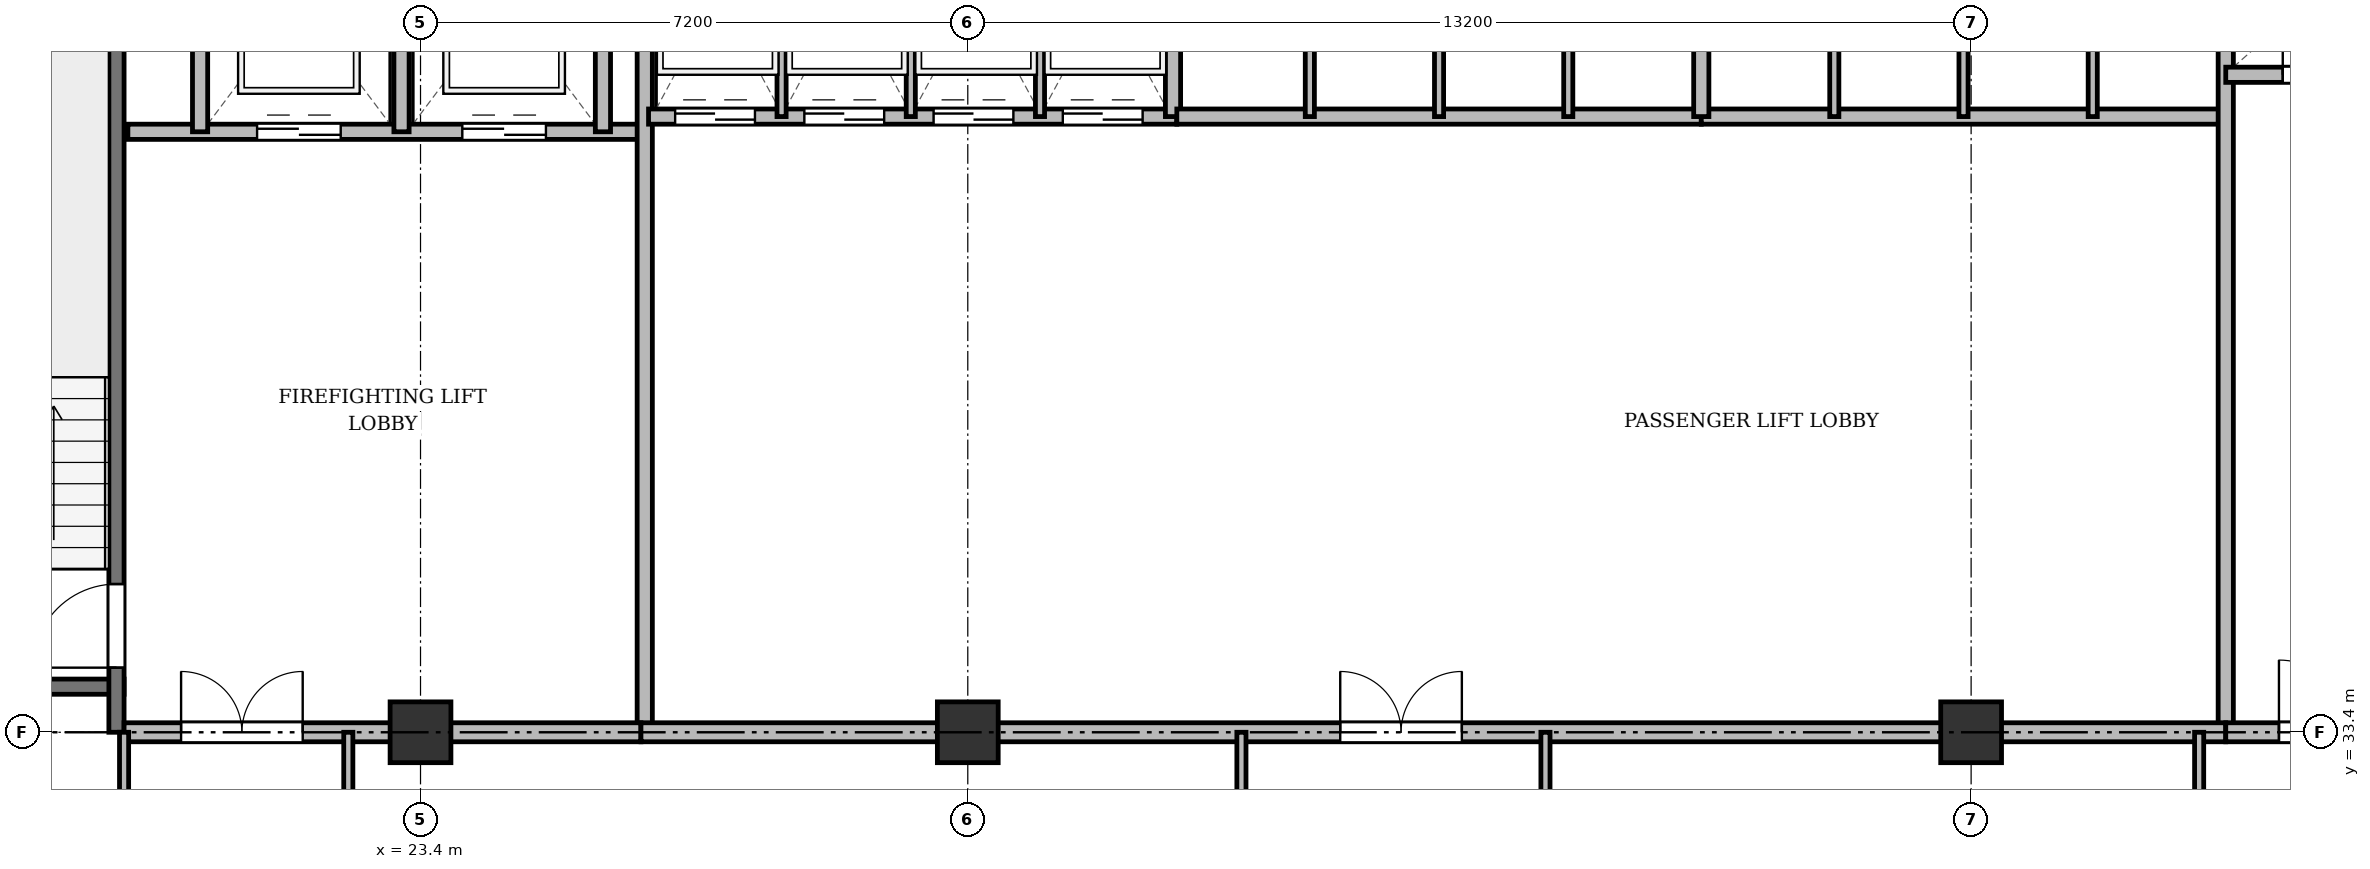
"""IFC4 building model, lengths in metres.
Left out: names, types, materials, properties, quantities, classifications, styles, units other than length and angle.
Written with IfcOpenShell. Run it as: python <this file> out.ifc"""

import sys

from ifc_helpers import new_model, si_unit, direction, frame, frame_2d, origin, origin_2d, place, context, subcontext, project, spatial, rectangle, extrude, source, transform, mapped, element, fill, save


model = new_model("IFC4")
c1 = context("Model", 3, precision=1e-05, world=origin(), true_north=direction((0.0, 1.0)))
c2 = subcontext(c1, "Body", "Model", "MODEL_VIEW")
j1 = project(units=[si_unit("LENGTHUNIT", "METRE"), si_unit("PLANEANGLEUNIT", "RADIAN")], contexts=[c1])
p1 = place(None, origin())
s1 = spatial("IfcSite", under=j1, at=p1, CompositionType="ELEMENT")
p2 = place(p1, origin())
s2 = spatial("IfcBuilding", under=s1, at=p2, CompositionType="ELEMENT")
p3 = place(p2, frame((0.0, 0.0, 88.9)))
s3 = spatial("IfcBuildingStorey", under=s2, at=p3, CompositionType="ELEMENT", Elevation=88.9)
m1 = source(origin(), c2, "Body", "SweptSolid", [
    extrude(rectangle(XDim=0.8, YDim=0.8, at=origin_2d()), origin(), (0.0, 0.0, 1.0), 3.6),
])
for number, where, z_axis, x_axis in (
    (1, (23.4, 33.4, 0.0), (0.0, 0.0, 1.0), (1.0, 0.0, 0.0)),
    (2, (30.6, 33.4, 0.0), (0.0, 0.0, 1.0), (1.0, 0.0, 0.0)),
    (3, (43.8, 33.4, 0.0), (0.0, 0.0, 1.0), (1.0, 0.0, 0.0)),
):
    element("IfcColumn", number, at=place(p3, frame(where, z_axis=z_axis, x_axis=x_axis)), inside=s3, PredefinedType="COLUMN", context=c2, shape_type="MappedRepresentation", body=[
        mapped(m1, transform((0.0, 0.0, 0.0), x_axis=(1.0, 0.0, 0.0), y_axis=(0.0, 1.0, 0.0), z_axis=(0.0, 0.0, 1.0), scale=1.0)),
    ])
p4 = place(p3, frame((16.1, 34.0, 0.0), z_axis=(0.0, 0.0, 1.0), x_axis=(1.0, 0.0, 0.0)))
e4 = element("IfcWall", 4, at=p4, inside=s3, PredefinedType="SHEAR", context=c2, shape_type="SweptSolid", body=[
    extrude(rectangle(XDim=3.4, YDim=0.2, at=frame_2d((1.7, 0.0))), origin(), (0.0, 0.0, 1.0), 3.34),
])
p5 = place(p3, frame((19.4, 33.4, 0.0), z_axis=(0.0, 0.0, 1.0), x_axis=(0.0, 1.0, 0.0)))
e5 = element("IfcWall", 5, at=p5, inside=s3, PredefinedType="SHEAR", context=c2, shape_type="SweptSolid", body=[
    extrude(rectangle(XDim=11.1, YDim=0.2, at=frame_2d((5.55, 0.0))), origin(), (0.0, 0.0, 1.0), 3.34),
])
p6 = place(p5, frame((0.85, 0.0, 0.0)))
e6 = element("IfcOpeningElement", 6, at=p6, cuts=e5, PredefinedType="OPENING", context=c2, shape_type="SweptSolid", body=[
    extrude(rectangle(XDim=1.1, YDim=2.15, at=frame_2d((0.55, 1.075))), frame((0.0, 0.11, 0.0), z_axis=(0.0, -1.0, 0.0), x_axis=(1.0, 0.0, 0.0)), (0.0, 0.0, 1.0), 0.22),
])
p7 = place(p3, frame((19.55, 41.3, 0.0), z_axis=(0.0, 0.0, 1.0), x_axis=(1.0, 0.0, 0.0)))
e7 = element("IfcWall", 7, at=p7, inside=s3, PredefinedType="SOLIDWALL", context=c2, shape_type="SweptSolid", body=[
    extrude(rectangle(XDim=6.75, YDim=0.2, at=frame_2d((3.375, 0.0))), origin(), (0.0, 0.0, 1.0), 3.34),
])
p8 = place(p7, frame((1.7, 0.0, 0.0)))
e8 = element("IfcOpeningElement", 8, at=p8, cuts=e7, PredefinedType="OPENING", context=c2, shape_type="SweptSolid", body=[
    extrude(rectangle(XDim=1.1, YDim=2.15, at=frame_2d((0.55, 1.075))), frame((0.0, 0.11, 0.0), z_axis=(0.0, -1.0, 0.0), x_axis=(1.0, 0.0, 0.0)), (0.0, 0.0, 1.0), 0.22),
])
p9 = place(p7, frame((4.4, 0.0, 0.0)))
e9 = element("IfcOpeningElement", 9, at=p9, cuts=e7, PredefinedType="OPENING", context=c2, shape_type="SweptSolid", body=[
    extrude(rectangle(XDim=1.1, YDim=2.15, at=frame_2d((0.55, 1.075))), frame((0.0, 0.11, 0.0), z_axis=(0.0, -1.0, 0.0), x_axis=(1.0, 0.0, 0.0)), (0.0, 0.0, 1.0), 0.22),
])
for number, where, z_axis, x_axis in (
    (10, (20.5, 41.3, 0.0), (0.0, 0.0, 1.0), (0.0, 1.0, 0.0)),
    (11, (23.15, 41.3, 0.0), (0.0, 0.0, 1.0), (0.0, 1.0, 0.0)),
    (12, (25.8, 41.3, 0.0), (0.0, 0.0, 1.0), (0.0, 1.0, 0.0)),
):
    element("IfcWall", number, at=place(p3, frame(where, z_axis=z_axis, x_axis=x_axis)), inside=s3, PredefinedType="SOLIDWALL", context=c2, shape_type="SweptSolid", body=[
        extrude(rectangle(XDim=3.4, YDim=0.2, at=frame_2d((1.7, 0.0))), origin(), (0.0, 0.0, 1.0), 3.34),
    ])
p10 = place(p3, frame((26.35, 33.4, 0.0), z_axis=(0.0, 0.0, 1.0), x_axis=(0.0, 1.0, 0.0)))
e13 = element("IfcWall", 13, at=p10, inside=s3, PredefinedType="SOLIDWALL", context=c2, shape_type="SweptSolid", body=[
    extrude(rectangle(XDim=11.3, YDim=0.2, at=frame_2d((5.65, 0.0))), origin(), (0.0, 0.0, 1.0), 2.752),
])
p11 = place(p3, frame((19.5, 33.4, 0.0), z_axis=(0.0, 0.0, 1.0), x_axis=(1.0, 0.0, 0.0)))
e14 = element("IfcWall", 14, at=p11, inside=s3, PredefinedType="PARTITIONING", context=c2, shape_type="SweptSolid", body=[
    extrude(rectangle(XDim=6.8, YDim=0.25, at=frame_2d((3.4, 0.0))), origin(), (0.0, 0.0, 1.0), 2.752),
])
p12 = place(p11, frame((0.75, 0.0, 0.0)))
e15 = element("IfcOpeningElement", 15, at=p12, cuts=e14, PredefinedType="OPENING", context=c2, shape_type="SweptSolid", body=[
    extrude(rectangle(XDim=1.6, YDim=2.2, at=frame_2d((0.8, 1.1))), frame((0.0, 0.135, 0.0), z_axis=(0.0, -1.0, 0.0), x_axis=(1.0, 0.0, 0.0)), (0.0, 0.0, 1.0), 0.27),
])
p13 = place(p3, frame((26.4, 41.5, 0.0), z_axis=(0.0, 0.0, 1.0), x_axis=(1.0, 0.0, 0.0)))
e16 = element("IfcWall", 16, at=p13, inside=s3, PredefinedType="SOLIDWALL", context=c2, shape_type="SweptSolid", body=[
    extrude(rectangle(XDim=6.95, YDim=0.2, at=frame_2d((3.475, 0.0))), origin(), (0.0, 0.0, 1.0), 3.34),
])
p14 = place(p13, frame((0.35, 0.0, 0.0)))
e17 = element("IfcOpeningElement", 17, at=p14, cuts=e16, PredefinedType="OPENING", context=c2, shape_type="SweptSolid", body=[
    extrude(rectangle(XDim=1.05, YDim=2.15, at=frame_2d((0.525, 1.075))), frame((0.0, 0.11, 0.0), z_axis=(0.0, -1.0, 0.0), x_axis=(1.0, 0.0, 0.0)), (0.0, 0.0, 1.0), 0.22),
])
p15 = place(p13, frame((2.05, 0.0, 0.0)))
e18 = element("IfcOpeningElement", 18, at=p15, cuts=e16, PredefinedType="OPENING", context=c2, shape_type="SweptSolid", body=[
    extrude(rectangle(XDim=1.05, YDim=2.15, at=frame_2d((0.525, 1.075))), frame((0.0, 0.11, 0.0), z_axis=(0.0, -1.0, 0.0), x_axis=(1.0, 0.0, 0.0)), (0.0, 0.0, 1.0), 0.22),
])
p16 = place(p13, frame((3.75, 0.0, 0.0)))
e19 = element("IfcOpeningElement", 19, at=p16, cuts=e16, PredefinedType="OPENING", context=c2, shape_type="SweptSolid", body=[
    extrude(rectangle(XDim=1.05, YDim=2.15, at=frame_2d((0.525, 1.075))), frame((0.0, 0.11, 0.0), z_axis=(0.0, -1.0, 0.0), x_axis=(1.0, 0.0, 0.0)), (0.0, 0.0, 1.0), 0.22),
])
p17 = place(p13, frame((5.45, 0.0, 0.0)))
e20 = element("IfcOpeningElement", 20, at=p17, cuts=e16, PredefinedType="OPENING", context=c2, shape_type="SweptSolid", body=[
    extrude(rectangle(XDim=1.05, YDim=2.15, at=frame_2d((0.525, 1.075))), frame((0.0, 0.11, 0.0), z_axis=(0.0, -1.0, 0.0), x_axis=(1.0, 0.0, 0.0)), (0.0, 0.0, 1.0), 0.22),
])
p18 = place(p3, frame((33.3, 41.5, 0.0), z_axis=(0.0, 0.0, 1.0), x_axis=(0.0, 1.0, 0.0)))
e21 = element("IfcWall", 21, at=p18, inside=s3, PredefinedType="SOLIDWALL", context=c2, shape_type="SweptSolid", body=[
    extrude(rectangle(XDim=3.2, YDim=0.2, at=frame_2d((1.6, 0.0))), origin(), (0.0, 0.0, 1.0), 3.34),
])
for number, where, z_axis, x_axis in (
    (22, (28.15, 41.5, 0.0), (0.0, 0.0, 1.0), (0.0, 1.0, 0.0)),
    (23, (29.85, 41.5, 0.0), (0.0, 0.0, 1.0), (0.0, 1.0, 0.0)),
    (24, (31.55, 41.5, 0.0), (0.0, 0.0, 1.0), (0.0, 1.0, 0.0)),
):
    element("IfcWall", number, at=place(p3, frame(where, z_axis=z_axis, x_axis=x_axis)), inside=s3, PredefinedType="PARTITIONING", context=c2, shape_type="SweptSolid", body=[
        extrude(rectangle(XDim=3.2, YDim=0.12, at=frame_2d((1.6, 0.0))), origin(), (0.0, 0.0, 1.0), 3.34),
    ])
p19 = place(p3, frame((33.35, 41.5, 0.0), z_axis=(0.0, 0.0, 1.0), x_axis=(1.0, 0.0, 0.0)))
e25 = element("IfcWall", 25, at=p19, inside=s3, PredefinedType="SOLIDWALL", context=c2, shape_type="SweptSolid", body=[
    extrude(rectangle(XDim=6.9, YDim=0.2, at=frame_2d((3.45, 0.0))), origin(), (0.0, 0.0, 1.0), 3.34),
])
for number, where, z_axis, x_axis in (
    (26, (35.1, 41.5, 0.0), (0.0, 0.0, 1.0), (0.0, 1.0, 0.0)),
    (27, (36.8, 41.5, 0.0), (0.0, 0.0, 1.0), (0.0, 1.0, 0.0)),
    (28, (38.5, 41.5, 0.0), (0.0, 0.0, 1.0), (0.0, 1.0, 0.0)),
):
    element("IfcWall", number, at=place(p3, frame(where, z_axis=z_axis, x_axis=x_axis)), inside=s3, PredefinedType="PARTITIONING", context=c2, shape_type="SweptSolid", body=[
        extrude(rectangle(XDim=3.2, YDim=0.12, at=frame_2d((1.6, 0.0))), origin(), (0.0, 0.0, 1.0), 3.34),
    ])
p20 = place(p3, frame((40.25, 41.5, 0.0), z_axis=(0.0, 0.0, 1.0), x_axis=(1.0, 0.0, 0.0)))
e29 = element("IfcWall", 29, at=p20, inside=s3, PredefinedType="SOLIDWALL", context=c2, shape_type="SweptSolid", body=[
    extrude(rectangle(XDim=6.9, YDim=0.2, at=frame_2d((3.45, 0.0))), origin(), (0.0, 0.0, 1.0), 2.84),
])
p21 = place(p3, frame((40.25, 41.5, 0.0), z_axis=(0.0, 0.0, 1.0), x_axis=(0.0, 1.0, 0.0)))
e30 = element("IfcWall", 30, at=p21, inside=s3, PredefinedType="SOLIDWALL", context=c2, shape_type="SweptSolid", body=[
    extrude(rectangle(XDim=3.2, YDim=0.2, at=frame_2d((1.6, 0.0))), origin(), (0.0, 0.0, 1.0), 3.34),
])
p22 = place(p3, frame((42.0, 41.5, 0.0), z_axis=(0.0, 0.0, 1.0), x_axis=(0.0, 1.0, 0.0)))
e31 = element("IfcWall", 31, at=p22, inside=s3, PredefinedType="PARTITIONING", context=c2, shape_type="SweptSolid", body=[
    extrude(rectangle(XDim=3.2, YDim=0.12, at=frame_2d((1.6, 0.0))), origin(), (0.0, 0.0, 1.0), 3.34),
])
p23 = place(p3, frame((43.7, 41.5, 0.0), z_axis=(0.0, 0.0, 1.0), x_axis=(0.0, 1.0, 0.0)))
e32 = element("IfcWall", 32, at=p23, inside=s3, PredefinedType="PARTITIONING", context=c2, shape_type="SweptSolid", body=[
    extrude(rectangle(XDim=3.2, YDim=0.12, at=frame_2d((1.6, 0.0))), origin(), (0.0, 0.0, 1.0), 2.84),
])
p24 = place(p3, frame((45.4, 41.5, 0.0), z_axis=(0.0, 0.0, 1.0), x_axis=(0.0, 1.0, 0.0)))
e33 = element("IfcWall", 33, at=p24, inside=s3, PredefinedType="PARTITIONING", context=c2, shape_type="SweptSolid", body=[
    extrude(rectangle(XDim=3.2, YDim=0.12, at=frame_2d((1.6, 0.0))), origin(), (0.0, 0.0, 1.0), 3.34),
])
p25 = place(p3, frame((47.15, 33.4, 0.0), z_axis=(0.0, 0.0, 1.0), x_axis=(0.0, 1.0, 0.0)))
e34 = element("IfcWall", 34, at=p25, inside=s3, PredefinedType="SOLIDWALL", context=c2, shape_type="SweptSolid", body=[
    extrude(rectangle(XDim=11.3, YDim=0.2, at=frame_2d((5.65, 0.0))), origin(), (0.0, 0.0, 1.0), 2.752),
])
p26 = place(p3, frame((26.3, 33.4, 0.0), z_axis=(0.0, 0.0, 1.0), x_axis=(1.0, 0.0, 0.0)))
e35 = element("IfcWall", 35, at=p26, inside=s3, PredefinedType="PARTITIONING", context=c2, shape_type="SweptSolid", body=[
    extrude(rectangle(XDim=20.85, YDim=0.25, at=frame_2d((10.425, 0.0))), origin(), (0.0, 0.0, 1.0), 2.752),
])
p27 = place(p26, frame((9.2, 0.0, 0.0)))
e36 = element("IfcOpeningElement", 36, at=p27, cuts=e35, PredefinedType="OPENING", context=c2, shape_type="SweptSolid", body=[
    extrude(rectangle(XDim=1.6, YDim=2.2, at=frame_2d((0.8, 1.1))), frame((0.0, 0.135, 0.0), z_axis=(0.0, -1.0, 0.0), x_axis=(1.0, 0.0, 0.0)), (0.0, 0.0, 1.0), 0.27),
])
p28 = place(p3, frame((47.15, 42.05, 0.0), z_axis=(0.0, 0.0, 1.0), x_axis=(1.0, 0.0, 0.0)))
e37 = element("IfcWall", 37, at=p28, inside=s3, PredefinedType="SOLIDWALL", context=c2, shape_type="SweptSolid", body=[
    extrude(rectangle(XDim=7.85, YDim=0.2, at=frame_2d((3.925, 0.0))), origin(), (0.0, 0.0, 1.0), 2.84),
])
p29 = place(p28, frame((0.75, 0.0, 0.0)))
e38 = element("IfcOpeningElement", 38, at=p29, cuts=e37, PredefinedType="OPENING", context=c2, shape_type="SweptSolid", body=[
    extrude(rectangle(XDim=0.9, YDim=2.1, at=frame_2d((0.45, 1.05))), frame((0.0, 0.11, 0.0), z_axis=(0.0, -1.0, 0.0), x_axis=(1.0, 0.0, 0.0)), (0.0, 0.0, 1.0), 0.22),
])
p30 = place(p28, frame((3.85, 0.0, 0.0)))
e39 = element("IfcOpeningElement", 39, at=p30, cuts=e37, PredefinedType="OPENING", context=c2, shape_type="SweptSolid", body=[
    extrude(rectangle(XDim=0.9, YDim=2.1, at=frame_2d((0.45, 1.05))), frame((0.0, 0.11, 0.0), z_axis=(0.0, -1.0, 0.0), x_axis=(1.0, 0.0, 0.0)), (0.0, 0.0, 1.0), 0.22),
])
p31 = place(p3, frame((47.15, 33.4, 0.0), z_axis=(0.0, 0.0, 1.0), x_axis=(1.0, 0.0, 0.0)))
e40 = element("IfcWall", 40, at=p31, inside=s3, PredefinedType="PARTITIONING", context=c2, shape_type="SweptSolid", body=[
    extrude(rectangle(XDim=11.15, YDim=0.25, at=frame_2d((5.575, 0.0))), origin(), (0.0, 0.0, 1.0), 2.752),
])
p32 = place(p31, frame((0.7, 0.0, 0.0)))
e41 = element("IfcOpeningElement", 41, at=p32, cuts=e40, PredefinedType="OPENING", context=c2, shape_type="SweptSolid", body=[
    extrude(rectangle(XDim=0.95, YDim=2.15, at=frame_2d((0.475, 1.075))), frame((0.0, 0.135, 0.0), z_axis=(0.0, -1.0, 0.0), x_axis=(1.0, 0.0, 0.0)), (0.0, 0.0, 1.0), 0.27),
])
p33 = place(p31, frame((6.0, 0.0, 0.0)))
e42 = element("IfcOpeningElement", 42, at=p33, cuts=e40, PredefinedType="OPENING", context=c2, shape_type="SweptSolid", body=[
    extrude(rectangle(XDim=1.2, YDim=2.15, at=frame_2d((0.6, 1.075))), frame((0.0, 0.135, 0.0), z_axis=(0.0, -1.0, 0.0), x_axis=(1.0, 0.0, 0.0)), (0.0, 0.0, 1.0), 0.27),
])
for number, where, z_axis, x_axis in (
    (43, (19.5, 29.8, 0.0), (0.0, 0.0, 1.0), (0.0, 1.0, 0.0)),
    (44, (22.45, 29.8, 0.0), (0.0, 0.0, 1.0), (0.0, 1.0, 0.0)),
    (45, (34.2, 29.8, 0.0), (0.0, 0.0, 1.0), (0.0, 1.0, 0.0)),
    (46, (38.2, 29.8, 0.0), (0.0, 0.0, 1.0), (0.0, 1.0, 0.0)),
    (47, (46.8, 29.8, 0.0), (0.0, 0.0, 1.0), (0.0, 1.0, 0.0)),
):
    element("IfcWall", number, at=place(p3, frame(where, z_axis=z_axis, x_axis=x_axis)), inside=s3, PredefinedType="PARTITIONING", context=c2, shape_type="SweptSolid", body=[
        extrude(rectangle(XDim=3.6, YDim=0.12, at=frame_2d((1.8, 0.0))), origin(), (0.0, 0.0, 1.0), 2.752),
    ])
m2 = source(origin(), c2, "Body", "SweptSolid", [
    extrude(rectangle(XDim=1.1, YDim=2.15, at=frame_2d((0.55, 1.075))), frame((0.0, 0.025, 0.0), z_axis=(0.0, -1.0, 0.0), x_axis=(1.0, 0.0, 0.0)), (0.0, 0.0, 1.0), 0.05),
])
p34 = place(p6, origin())
e48 = element("IfcDoor", 48, at=p34, inside=s3, OperationType="SINGLE_SWING_LEFT", PredefinedType="DOOR", context=c2, shape_type="MappedRepresentation", body=[
    mapped(m2, transform((0.0, 0.0, 0.0), x_axis=(1.0, 0.0, 0.0), y_axis=(0.0, 1.0, 0.0), z_axis=(0.0, 0.0, 1.0), scale=1.0)),
])
fill(e6, e48)
p35 = place(p8, origin())
e49 = element("IfcDoor", 49, at=p35, inside=s3, OperationType="DOUBLE_DOOR_SLIDING", PredefinedType="DOOR", context=c2, shape_type="MappedRepresentation", body=[
    mapped(m2, transform((0.0, 0.0, 0.0), x_axis=(1.0, 0.0, 0.0), y_axis=(0.0, 1.0, 0.0), z_axis=(0.0, 0.0, 1.0), scale=1.0)),
])
fill(e8, e49)
p36 = place(p9, origin())
e50 = element("IfcDoor", 50, at=p36, inside=s3, OperationType="DOUBLE_DOOR_SLIDING", PredefinedType="DOOR", context=c2, shape_type="MappedRepresentation", body=[
    mapped(m2, transform((0.0, 0.0, 0.0), x_axis=(1.0, 0.0, 0.0), y_axis=(0.0, 1.0, 0.0), z_axis=(0.0, 0.0, 1.0), scale=1.0)),
])
fill(e9, e50)
m3 = source(origin(), c2, "Body", "SweptSolid", [
    extrude(rectangle(XDim=1.6, YDim=2.2, at=frame_2d((0.8, 1.1))), frame((0.0, 0.025, 0.0), z_axis=(0.0, -1.0, 0.0), x_axis=(1.0, 0.0, 0.0)), (0.0, 0.0, 1.0), 0.05),
])
p37 = place(p12, origin())
e51 = element("IfcDoor", 51, at=p37, inside=s3, OperationType="DOUBLE_DOOR_SINGLE_SWING", PredefinedType="DOOR", context=c2, shape_type="MappedRepresentation", body=[
    mapped(m3, transform((0.0, 0.0, 0.0), x_axis=(1.0, 0.0, 0.0), y_axis=(0.0, 1.0, 0.0), z_axis=(0.0, 0.0, 1.0), scale=1.0)),
])
fill(e15, e51)
m4 = source(origin(), c2, "Body", "SweptSolid", [
    extrude(rectangle(XDim=1.05, YDim=2.15, at=frame_2d((0.525, 1.075))), frame((0.0, 0.025, 0.0), z_axis=(0.0, -1.0, 0.0), x_axis=(1.0, 0.0, 0.0)), (0.0, 0.0, 1.0), 0.05),
])
p38 = place(p14, origin())
e52 = element("IfcDoor", 52, at=p38, inside=s3, OperationType="DOUBLE_DOOR_SLIDING", PredefinedType="DOOR", context=c2, shape_type="MappedRepresentation", body=[
    mapped(m4, transform((0.0, 0.0, 0.0), x_axis=(1.0, 0.0, 0.0), y_axis=(0.0, 1.0, 0.0), z_axis=(0.0, 0.0, 1.0), scale=1.0)),
])
fill(e17, e52)
p39 = place(p15, origin())
e53 = element("IfcDoor", 53, at=p39, inside=s3, OperationType="DOUBLE_DOOR_SLIDING", PredefinedType="DOOR", context=c2, shape_type="MappedRepresentation", body=[
    mapped(m4, transform((0.0, 0.0, 0.0), x_axis=(1.0, 0.0, 0.0), y_axis=(0.0, 1.0, 0.0), z_axis=(0.0, 0.0, 1.0), scale=1.0)),
])
fill(e18, e53)
p40 = place(p16, origin())
e54 = element("IfcDoor", 54, at=p40, inside=s3, OperationType="DOUBLE_DOOR_SLIDING", PredefinedType="DOOR", context=c2, shape_type="MappedRepresentation", body=[
    mapped(m4, transform((0.0, 0.0, 0.0), x_axis=(1.0, 0.0, 0.0), y_axis=(0.0, 1.0, 0.0), z_axis=(0.0, 0.0, 1.0), scale=1.0)),
])
fill(e19, e54)
p41 = place(p17, origin())
e55 = element("IfcDoor", 55, at=p41, inside=s3, OperationType="DOUBLE_DOOR_SLIDING", PredefinedType="DOOR", context=c2, shape_type="MappedRepresentation", body=[
    mapped(m4, transform((0.0, 0.0, 0.0), x_axis=(1.0, 0.0, 0.0), y_axis=(0.0, 1.0, 0.0), z_axis=(0.0, 0.0, 1.0), scale=1.0)),
])
fill(e20, e55)
p42 = place(p27, origin())
e56 = element("IfcDoor", 56, at=p42, inside=s3, OperationType="DOUBLE_DOOR_SINGLE_SWING", PredefinedType="DOOR", context=c2, shape_type="MappedRepresentation", body=[
    mapped(m3, transform((0.0, 0.0, 0.0), x_axis=(1.0, 0.0, 0.0), y_axis=(0.0, 1.0, 0.0), z_axis=(0.0, 0.0, 1.0), scale=1.0)),
])
fill(e36, e56)
m5 = source(origin(), c2, "Body", "SweptSolid", [
    extrude(rectangle(XDim=0.9, YDim=2.1, at=frame_2d((0.45, 1.05))), frame((0.0, 0.025, 0.0), z_axis=(0.0, -1.0, 0.0), x_axis=(1.0, 0.0, 0.0)), (0.0, 0.0, 1.0), 0.05),
])
p43 = place(p29, origin())
e57 = element("IfcDoor", 57, at=p43, inside=s3, OperationType="SINGLE_SWING_LEFT", PredefinedType="DOOR", context=c2, shape_type="MappedRepresentation", body=[
    mapped(m5, transform((0.0, 0.0, 0.0), x_axis=(1.0, 0.0, 0.0), y_axis=(0.0, 1.0, 0.0), z_axis=(0.0, 0.0, 1.0), scale=1.0)),
])
fill(e38, e57)
m6 = source(origin(), c2, "Body", "SweptSolid", [
    extrude(rectangle(XDim=0.95, YDim=2.15, at=frame_2d((0.475, 1.075))), frame((0.0, 0.025, 0.0), z_axis=(0.0, -1.0, 0.0), x_axis=(1.0, 0.0, 0.0)), (0.0, 0.0, 1.0), 0.05),
])
p44 = place(p32, origin())
e58 = element("IfcDoor", 58, at=p44, inside=s3, OperationType="SINGLE_SWING_LEFT", PredefinedType="DOOR", context=c2, shape_type="MappedRepresentation", body=[
    mapped(m6, transform((0.0, 0.0, 0.0), x_axis=(1.0, 0.0, 0.0), y_axis=(0.0, 1.0, 0.0), z_axis=(0.0, 0.0, 1.0), scale=1.0)),
])
fill(e41, e58)
save(model, sys.argv[1])
